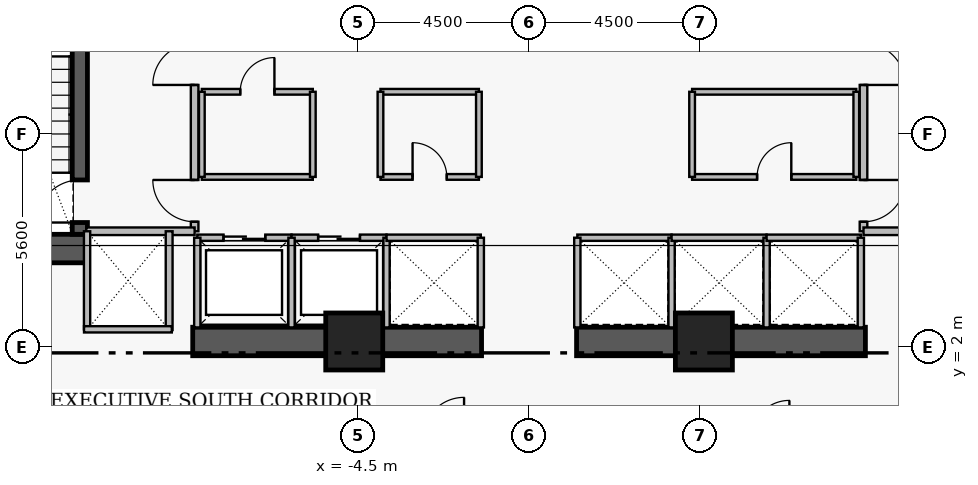
"""IFC4 building model, lengths in metres.
Left out: names, types, materials, properties, quantities, classifications, styles, units other than length and angle.
Written with IfcOpenShell. Run it as: python <this file> out.ifc"""

import sys

from ifc_helpers import new_model, si_unit, direction, frame, frame_2d, origin, origin_2d, place, context, subcontext, project, spatial, rectangle, extrude, element, fill, save


model = new_model("IFC4")
c1 = context("Model", 3, precision=1e-05, world=origin(), true_north=direction((0.0, 1.0)))
c2 = subcontext(c1, "Body", "Model", "MODEL_VIEW")
j1 = project(units=[si_unit("LENGTHUNIT", "METRE"), si_unit("PLANEANGLEUNIT", "RADIAN")], contexts=[c1])
p1 = place(None, origin())
s1 = spatial("IfcSite", under=j1, at=p1, CompositionType="ELEMENT")
p2 = place(p1, origin())
s2 = spatial("IfcBuilding", under=s1, at=p2, CompositionType="ELEMENT")
p3 = place(p2, frame((0.0, 0.0, 132.15)))
s3 = spatial("IfcBuildingStorey", under=s2, at=p3, CompositionType="ELEMENT", Elevation=132.15)
p4 = place(p3, frame((-16.16, 4.595, 0.0), z_axis=(0.0, 0.0, 1.0), x_axis=(1.0, 0.0, 0.0)))
e1 = element("IfcWall", 1, at=p4, inside=s3, PredefinedType="SHEAR", context=c2, shape_type="SweptSolid", body=[
    extrude(rectangle(XDim=4.56, YDim=0.75, at=frame_2d((2.28, 0.0))), origin(), (0.0, 0.0, 1.0), 3.46),
])
for number, where, z_axis, x_axis in (
    (2, (-8.85, 2.15, 0.0), (0.0, 0.0, 1.0), (1.0, 0.0, 0.0)),
    (3, (1.25, 2.15, 0.0), (0.0, 0.0, 1.0), (1.0, 0.0, 0.0)),
):
    element("IfcWall", number, at=place(p3, frame(where, z_axis=z_axis, x_axis=x_axis)), inside=s3, PredefinedType="SHEAR", context=c2, shape_type="SweptSolid", body=[
        extrude(rectangle(XDim=7.6, YDim=0.75, at=frame_2d((3.8, 0.0))), origin(), (0.0, 0.0, 1.0), 3.43),
    ])
p5 = place(p3, frame((-11.82, 4.97, 0.0), z_axis=(0.0, 0.0, 1.0), x_axis=(0.0, 1.0, 0.0)))
e4 = element("IfcWall", 4, at=p5, inside=s3, PredefinedType="SHEAR", context=c2, shape_type="SweptSolid", body=[
    extrude(rectangle(XDim=8.96, YDim=0.4, at=frame_2d((4.48, 0.0))), origin(), (0.0, 0.0, 1.0), 3.46),
])
p6 = place(p5, frame((0.31, 0.0, 0.0)))
e5 = element("IfcOpeningElement", 5, at=p6, cuts=e4, PredefinedType="OPENING", context=c2, shape_type="SweptSolid", body=[
    extrude(rectangle(XDim=1.12, YDim=2.22, at=frame_2d((0.56, 1.11))), frame((0.0, 0.21, 0.0), z_axis=(0.0, -1.0, 0.0), x_axis=(1.0, 0.0, 0.0)), (0.0, 0.0, 1.0), 0.42),
])
for number, where, z_axis, x_axis in (
    (6, (-4.6, 2.15, 0.0), (0.0, 0.0, 1.0), (1.0, 0.0, 0.0)),
    (7, (4.6, 2.15, 0.0), (0.0, 0.0, 1.0), (1.0, 0.0, 0.0)),
):
    element("IfcColumn", number, at=place(p3, frame(where, z_axis=z_axis, x_axis=x_axis)), inside=s3, PredefinedType="COLUMN", context=c2, shape_type="SweptSolid", body=[
        extrude(rectangle(XDim=1.5, YDim=1.5, at=origin_2d()), origin(), (0.0, 0.0, 1.0), 3.65),
    ])
p7 = place(p3, frame((-8.8, 5.05, 0.0), z_axis=(0.0, 0.0, 1.0), x_axis=(0.0, 1.0, 0.0)))
e8 = element("IfcWall", 8, at=p7, inside=s3, PredefinedType="PARTITIONING", context=c2, shape_type="SweptSolid", body=[
    extrude(rectangle(XDim=6.1, YDim=0.2, at=frame_2d((3.05, 0.0))), origin(), (0.0, 0.0, 1.0), 3.43),
])
p8 = place(p7, frame((0.25, 0.0, 0.0)))
e9 = element("IfcOpeningElement", 9, at=p8, cuts=e8, PredefinedType="OPENING", context=c2, shape_type="SweptSolid", body=[
    extrude(rectangle(XDim=1.1, YDim=2.2, at=frame_2d((0.55, 1.1))), frame((0.0, 0.11, 0.0), z_axis=(0.0, -1.0, 0.0), x_axis=(1.0, 0.0, 0.0)), (0.0, 0.0, 1.0), 0.22),
])
p9 = place(p7, frame((3.85, 0.0, 0.0)))
e10 = element("IfcOpeningElement", 10, at=p9, cuts=e8, PredefinedType="OPENING", context=c2, shape_type="SweptSolid", body=[
    extrude(rectangle(XDim=1.1, YDim=2.2, at=frame_2d((0.55, 1.1))), frame((0.0, 0.11, 0.0), z_axis=(0.0, -1.0, 0.0), x_axis=(1.0, 0.0, 0.0)), (0.0, 0.0, 1.0), 0.22),
])
p10 = place(p3, frame((8.8, 11.15, 0.0), z_axis=(0.0, 0.0, 1.0), x_axis=(0.0, -1.0, 0.0)))
e11 = element("IfcWall", 11, at=p10, inside=s3, PredefinedType="PARTITIONING", context=c2, shape_type="SweptSolid", body=[
    extrude(rectangle(XDim=6.1, YDim=0.2, at=frame_2d((3.05, 0.0))), origin(), (0.0, 0.0, 1.0), 3.43),
])
p11 = place(p10, frame((1.15, 0.0, 0.0)))
e12 = element("IfcOpeningElement", 12, at=p11, cuts=e11, PredefinedType="OPENING", context=c2, shape_type="SweptSolid", body=[
    extrude(rectangle(XDim=1.1, YDim=2.2, at=frame_2d((0.55, 1.1))), frame((0.0, 0.11, 0.0), z_axis=(0.0, -1.0, 0.0), x_axis=(1.0, 0.0, 0.0)), (0.0, 0.0, 1.0), 0.22),
])
p12 = place(p10, frame((4.75, 0.0, 0.0)))
e13 = element("IfcOpeningElement", 13, at=p12, cuts=e11, PredefinedType="OPENING", context=c2, shape_type="SweptSolid", body=[
    extrude(rectangle(XDim=1.1, YDim=2.2, at=frame_2d((0.55, 1.1))), frame((0.0, 0.11, 0.0), z_axis=(0.0, -1.0, 0.0), x_axis=(1.0, 0.0, 0.0)), (0.0, 0.0, 1.0), 0.22),
])
p13 = place(p3, frame((-8.73, 4.88, 0.0), z_axis=(0.0, 0.0, 1.0), x_axis=(1.0, 0.0, 0.0)))
e14 = element("IfcWall", 14, at=p13, inside=s3, PredefinedType="PARTITIONING", context=c2, shape_type="SweptSolid", body=[
    extrude(rectangle(XDim=2.48, YDim=0.165, at=frame_2d((1.24, 0.0))), origin(), (0.0, 0.0, 1.0), 3.43),
])
p14 = place(p13, frame((0.69, 0.0, 0.0)))
e15 = element("IfcOpeningElement", 15, at=p14, cuts=e14, PredefinedType="OPENING", context=c2, shape_type="SweptSolid", body=[
    extrude(rectangle(XDim=1.1, YDim=2.25, at=frame_2d((0.55, 1.125))), frame((0.0, 0.093, 0.0), z_axis=(0.0, -1.0, 0.0), x_axis=(1.0, 0.0, 0.0)), (0.0, 0.0, 1.0), 0.185),
])
p15 = place(p3, frame((-6.25, 4.88, 0.0), z_axis=(0.0, 0.0, 1.0), x_axis=(1.0, 0.0, 0.0)))
e16 = element("IfcWall", 16, at=p15, inside=s3, PredefinedType="PARTITIONING", context=c2, shape_type="SweptSolid", body=[
    extrude(rectangle(XDim=2.5, YDim=0.165, at=frame_2d((1.25, 0.0))), origin(), (0.0, 0.0, 1.0), 3.43),
])
p16 = place(p15, frame((0.7, 0.0, 0.0)))
e17 = element("IfcOpeningElement", 17, at=p16, cuts=e16, PredefinedType="OPENING", context=c2, shape_type="SweptSolid", body=[
    extrude(rectangle(XDim=1.1, YDim=2.25, at=frame_2d((0.55, 1.125))), frame((0.0, 0.093, 0.0), z_axis=(0.0, -1.0, 0.0), x_axis=(1.0, 0.0, 0.0)), (0.0, 0.0, 1.0), 0.185),
])
p17 = place(p3, frame((-8.61, 8.72, 0.0), z_axis=(0.0, 0.0, 1.0), x_axis=(1.0, 0.0, 0.0)))
e18 = element("IfcWall", 18, at=p17, inside=s3, PredefinedType="PARTITIONING", context=c2, shape_type="SweptSolid", body=[
    extrude(rectangle(XDim=2.92, YDim=0.15, at=frame_2d((1.46, 0.0))), origin(), (0.0, 0.0, 1.0), 3.43),
])
p18 = place(p17, frame((1.01, 0.0, 0.0)))
e19 = element("IfcOpeningElement", 19, at=p18, cuts=e18, PredefinedType="OPENING", context=c2, shape_type="SweptSolid", body=[
    extrude(rectangle(XDim=0.9, YDim=2.15, at=frame_2d((0.45, 1.075))), frame((0.0, 0.085, 0.0), z_axis=(0.0, -1.0, 0.0), x_axis=(1.0, 0.0, 0.0)), (0.0, 0.0, 1.0), 0.17),
])
p19 = place(p3, frame((-3.91, 6.48, 0.0), z_axis=(0.0, 0.0, 1.0), x_axis=(1.0, 0.0, 0.0)))
e20 = element("IfcWall", 20, at=p19, inside=s3, PredefinedType="PARTITIONING", context=c2, shape_type="SweptSolid", body=[
    extrude(rectangle(XDim=2.59, YDim=0.15, at=frame_2d((1.295, 0.0))), origin(), (0.0, 0.0, 1.0), 3.43),
])
p20 = place(p19, frame((0.845, 0.0, 0.0)))
e21 = element("IfcOpeningElement", 21, at=p20, cuts=e20, PredefinedType="OPENING", context=c2, shape_type="SweptSolid", body=[
    extrude(rectangle(XDim=0.9, YDim=2.15, at=frame_2d((0.45, 1.075))), frame((0.0, 0.085, 0.0), z_axis=(0.0, -1.0, 0.0), x_axis=(1.0, 0.0, 0.0)), (0.0, 0.0, 1.0), 0.17),
])
p21 = place(p3, frame((4.29, 6.48, 0.0), z_axis=(0.0, 0.0, 1.0), x_axis=(1.0, 0.0, 0.0)))
e22 = element("IfcWall", 22, at=p21, inside=s3, PredefinedType="PARTITIONING", context=c2, shape_type="SweptSolid", body=[
    extrude(rectangle(XDim=4.32, YDim=0.15, at=frame_2d((2.16, 0.0))), origin(), (0.0, 0.0, 1.0), 3.43),
])
p22 = place(p21, frame((1.71, 0.0, 0.0)))
e23 = element("IfcOpeningElement", 23, at=p22, cuts=e22, PredefinedType="OPENING", context=c2, shape_type="SweptSolid", body=[
    extrude(rectangle(XDim=0.9, YDim=2.15, at=frame_2d((0.45, 1.075))), frame((0.0, 0.085, 0.0), z_axis=(0.0, -1.0, 0.0), x_axis=(1.0, 0.0, 0.0)), (0.0, 0.0, 1.0), 0.17),
])
for number, where, z_axis, x_axis in (
    (24, (-11.65, 5.05, 0.0), (0.0, 0.0, 1.0), (1.0, 0.0, 0.0)),
    (25, (8.8, 5.05, 0.0), (0.0, 0.0, 1.0), (1.0, 0.0, 0.0)),
):
    element("IfcWall", number, at=place(p3, frame(where, z_axis=z_axis, x_axis=x_axis)), inside=s3, PredefinedType="PARTITIONING", context=c2, shape_type="SweptSolid", body=[
        extrude(rectangle(XDim=2.85, YDim=0.2, at=frame_2d((1.425, 0.0))), origin(), (0.0, 0.0, 1.0), 3.43),
    ])
for number, where, z_axis, x_axis in (
    (26, (-8.73, 2.52, 0.0), (0.0, 0.0, 1.0), (0.0, 1.0, 0.0)),
    (27, (-6.25, 2.52, 0.0), (0.0, 0.0, 1.0), (0.0, 1.0, 0.0)),
    (28, (-3.75, 2.52, 0.0), (0.0, 0.0, 1.0), (0.0, 1.0, 0.0)),
):
    element("IfcWall", number, at=place(p3, frame(where, z_axis=z_axis, x_axis=x_axis)), inside=s3, PredefinedType="PARTITIONING", context=c2, shape_type="SweptSolid", body=[
        extrude(rectangle(XDim=2.36, YDim=0.165, at=frame_2d((1.18, 0.0))), origin(), (0.0, 0.0, 1.0), 3.43),
    ])
p23 = place(p3, frame((-3.75, 4.88, 0.0), z_axis=(0.0, 0.0, 1.0), x_axis=(1.0, 0.0, 0.0)))
e29 = element("IfcWall", 29, at=p23, inside=s3, PredefinedType="PARTITIONING", context=c2, shape_type="SweptSolid", body=[
    extrude(rectangle(XDim=2.48, YDim=0.165, at=frame_2d((1.24, 0.0))), origin(), (0.0, 0.0, 1.0), 3.43),
])
p24 = place(p3, frame((-1.27, 2.52, 0.0), z_axis=(0.0, 0.0, 1.0), x_axis=(0.0, 1.0, 0.0)))
e30 = element("IfcWall", 30, at=p24, inside=s3, PredefinedType="PARTITIONING", context=c2, shape_type="SweptSolid", body=[
    extrude(rectangle(XDim=2.36, YDim=0.165, at=frame_2d((1.18, 0.0))), origin(), (0.0, 0.0, 1.0), 3.43),
])
p25 = place(p3, frame((1.27, 4.88, 0.0), z_axis=(0.0, 0.0, 1.0), x_axis=(1.0, 0.0, 0.0)))
e31 = element("IfcWall", 31, at=p25, inside=s3, PredefinedType="PARTITIONING", context=c2, shape_type="SweptSolid", body=[
    extrude(rectangle(XDim=2.48, YDim=0.165, at=frame_2d((1.24, 0.0))), origin(), (0.0, 0.0, 1.0), 3.43),
])
for number, where, z_axis, x_axis in (
    (32, (1.27, 2.52, 0.0), (0.0, 0.0, 1.0), (0.0, 1.0, 0.0)),
    (33, (3.75, 2.52, 0.0), (0.0, 0.0, 1.0), (0.0, 1.0, 0.0)),
):
    element("IfcWall", number, at=place(p3, frame(where, z_axis=z_axis, x_axis=x_axis)), inside=s3, PredefinedType="PARTITIONING", context=c2, shape_type="SweptSolid", body=[
        extrude(rectangle(XDim=2.36, YDim=0.165, at=frame_2d((1.18, 0.0))), origin(), (0.0, 0.0, 1.0), 3.43),
    ])
p26 = place(p3, frame((3.75, 4.88, 0.0), z_axis=(0.0, 0.0, 1.0), x_axis=(1.0, 0.0, 0.0)))
e34 = element("IfcWall", 34, at=p26, inside=s3, PredefinedType="PARTITIONING", context=c2, shape_type="SweptSolid", body=[
    extrude(rectangle(XDim=2.5, YDim=0.165, at=frame_2d((1.25, 0.0))), origin(), (0.0, 0.0, 1.0), 3.43),
])
p27 = place(p3, frame((6.25, 2.52, 0.0), z_axis=(0.0, 0.0, 1.0), x_axis=(0.0, 1.0, 0.0)))
e35 = element("IfcWall", 35, at=p27, inside=s3, PredefinedType="PARTITIONING", context=c2, shape_type="SweptSolid", body=[
    extrude(rectangle(XDim=2.36, YDim=0.165, at=frame_2d((1.18, 0.0))), origin(), (0.0, 0.0, 1.0), 3.43),
])
p28 = place(p3, frame((6.25, 4.88, 0.0), z_axis=(0.0, 0.0, 1.0), x_axis=(1.0, 0.0, 0.0)))
e36 = element("IfcWall", 36, at=p28, inside=s3, PredefinedType="PARTITIONING", context=c2, shape_type="SweptSolid", body=[
    extrude(rectangle(XDim=2.48, YDim=0.165, at=frame_2d((1.24, 0.0))), origin(), (0.0, 0.0, 1.0), 3.43),
])
p29 = place(p3, frame((8.73, 2.52, 0.0), z_axis=(0.0, 0.0, 1.0), x_axis=(0.0, 1.0, 0.0)))
e37 = element("IfcWall", 37, at=p29, inside=s3, PredefinedType="PARTITIONING", context=c2, shape_type="SweptSolid", body=[
    extrude(rectangle(XDim=2.36, YDim=0.165, at=frame_2d((1.18, 0.0))), origin(), (0.0, 0.0, 1.0), 3.43),
])
p30 = place(p3, frame((-9.47, 2.45, 0.0), z_axis=(0.0, 0.0, 1.0), x_axis=(0.0, 1.0, 0.0)))
e38 = element("IfcWall", 38, at=p30, inside=s3, PredefinedType="PARTITIONING", context=c2, shape_type="SweptSolid", body=[
    extrude(rectangle(XDim=2.6, YDim=0.18, at=frame_2d((1.3, 0.0))), origin(), (0.0, 0.0, 1.0), 3.43),
])
p31 = place(p3, frame((-11.63, 2.47, 0.0), z_axis=(0.0, 0.0, 1.0), x_axis=(0.0, 1.0, 0.0)))
e39 = element("IfcWall", 39, at=p31, inside=s3, PredefinedType="PARTITIONING", context=c2, shape_type="SweptSolid", body=[
    extrude(rectangle(XDim=2.58, YDim=0.165, at=frame_2d((1.29, 0.0))), origin(), (0.0, 0.0, 1.0), 3.43),
])
p32 = place(p3, frame((-11.71, 2.47, 0.0), z_axis=(0.0, 0.0, 1.0), x_axis=(1.0, 0.0, 0.0)))
e40 = element("IfcWall", 40, at=p32, inside=s3, PredefinedType="PARTITIONING", context=c2, shape_type="SweptSolid", body=[
    extrude(rectangle(XDim=2.31, YDim=0.165, at=frame_2d((1.155, 0.0))), origin(), (0.0, 0.0, 1.0), 2.03),
])
p33 = place(p3, frame((-8.61, 6.48, 0.0), z_axis=(0.0, 0.0, 1.0), x_axis=(1.0, 0.0, 0.0)))
e41 = element("IfcWall", 41, at=p33, inside=s3, PredefinedType="PARTITIONING", context=c2, shape_type="SweptSolid", body=[
    extrude(rectangle(XDim=2.92, YDim=0.15, at=frame_2d((1.46, 0.0))), origin(), (0.0, 0.0, 1.0), 3.43),
])
for number, where, z_axis, x_axis in (
    (42, (-8.61, 6.48, 0.0), (0.0, 0.0, 1.0), (0.0, 1.0, 0.0)),
    (43, (-5.69, 6.48, 0.0), (0.0, 0.0, 1.0), (0.0, 1.0, 0.0)),
):
    element("IfcWall", number, at=place(p3, frame(where, z_axis=z_axis, x_axis=x_axis)), inside=s3, PredefinedType="PARTITIONING", context=c2, shape_type="SweptSolid", body=[
        extrude(rectangle(XDim=2.24, YDim=0.15, at=frame_2d((1.12, 0.0))), origin(), (0.0, 0.0, 1.0), 3.43),
    ])
p34 = place(p3, frame((-3.91, 8.72, 0.0), z_axis=(0.0, 0.0, 1.0), x_axis=(1.0, 0.0, 0.0)))
e44 = element("IfcWall", 44, at=p34, inside=s3, PredefinedType="PARTITIONING", context=c2, shape_type="SweptSolid", body=[
    extrude(rectangle(XDim=2.59, YDim=0.15, at=frame_2d((1.295, 0.0))), origin(), (0.0, 0.0, 1.0), 3.43),
])
for number, where, z_axis, x_axis in (
    (45, (-3.91, 6.48, 0.0), (0.0, 0.0, 1.0), (0.0, 1.0, 0.0)),
    (46, (-1.32, 6.48, 0.0), (0.0, 0.0, 1.0), (0.0, 1.0, 0.0)),
):
    element("IfcWall", number, at=place(p3, frame(where, z_axis=z_axis, x_axis=x_axis)), inside=s3, PredefinedType="PARTITIONING", context=c2, shape_type="SweptSolid", body=[
        extrude(rectangle(XDim=2.24, YDim=0.15, at=frame_2d((1.12, 0.0))), origin(), (0.0, 0.0, 1.0), 3.43),
    ])
p35 = place(p3, frame((4.29, 8.72, 0.0), z_axis=(0.0, 0.0, 1.0), x_axis=(1.0, 0.0, 0.0)))
e47 = element("IfcWall", 47, at=p35, inside=s3, PredefinedType="PARTITIONING", context=c2, shape_type="SweptSolid", body=[
    extrude(rectangle(XDim=4.32, YDim=0.15, at=frame_2d((2.16, 0.0))), origin(), (0.0, 0.0, 1.0), 3.43),
])
for number, where, z_axis, x_axis in (
    (48, (4.29, 6.48, 0.0), (0.0, 0.0, 1.0), (0.0, 1.0, 0.0)),
    (49, (8.61, 6.48, 0.0), (0.0, 0.0, 1.0), (0.0, 1.0, 0.0)),
):
    element("IfcWall", number, at=place(p3, frame(where, z_axis=z_axis, x_axis=x_axis)), inside=s3, PredefinedType="PARTITIONING", context=c2, shape_type="SweptSolid", body=[
        extrude(rectangle(XDim=2.24, YDim=0.15, at=frame_2d((1.12, 0.0))), origin(), (0.0, 0.0, 1.0), 3.43),
    ])
p36 = place(p6, origin())
e50 = element("IfcDoor", 50, at=p36, inside=s3, OperationType="SINGLE_SWING_LEFT", PredefinedType="DOOR", context=c2, shape_type="SweptSolid", body=[
    extrude(rectangle(XDim=1.12, YDim=2.22, at=frame_2d((0.56, 1.11))), frame((0.0, 0.025, 0.0), z_axis=(0.0, -1.0, 0.0), x_axis=(1.0, 0.0, 0.0)), (0.0, 0.0, 1.0), 0.05),
])
fill(e5, e50)
p37 = place(p8, origin())
e51 = element("IfcDoor", 51, at=p37, inside=s3, OperationType="SINGLE_SWING_RIGHT", PredefinedType="DOOR", context=c2, shape_type="SweptSolid", body=[
    extrude(rectangle(XDim=1.1, YDim=2.2, at=frame_2d((0.55, 1.1))), frame((0.0, 0.025, 0.0), z_axis=(0.0, -1.0, 0.0), x_axis=(1.0, 0.0, 0.0)), (0.0, 0.0, 1.0), 0.05),
])
fill(e9, e51)
p38 = place(p9, origin())
e52 = element("IfcDoor", 52, at=p38, inside=s3, OperationType="SINGLE_SWING_LEFT", PredefinedType="DOOR", context=c2, shape_type="SweptSolid", body=[
    extrude(rectangle(XDim=1.1, YDim=2.2, at=frame_2d((0.55, 1.1))), frame((0.0, 0.025, 0.0), z_axis=(0.0, -1.0, 0.0), x_axis=(1.0, 0.0, 0.0)), (0.0, 0.0, 1.0), 0.05),
])
fill(e10, e52)
p39 = place(p11, origin())
e53 = element("IfcDoor", 53, at=p39, inside=s3, OperationType="SINGLE_SWING_RIGHT", PredefinedType="DOOR", context=c2, shape_type="SweptSolid", body=[
    extrude(rectangle(XDim=1.1, YDim=2.2, at=frame_2d((0.55, 1.1))), frame((0.0, 0.025, 0.0), z_axis=(0.0, -1.0, 0.0), x_axis=(1.0, 0.0, 0.0)), (0.0, 0.0, 1.0), 0.05),
])
fill(e12, e53)
p40 = place(p12, origin())
e54 = element("IfcDoor", 54, at=p40, inside=s3, OperationType="SINGLE_SWING_LEFT", PredefinedType="DOOR", context=c2, shape_type="SweptSolid", body=[
    extrude(rectangle(XDim=1.1, YDim=2.2, at=frame_2d((0.55, 1.1))), frame((0.0, 0.025, 0.0), z_axis=(0.0, -1.0, 0.0), x_axis=(1.0, 0.0, 0.0)), (0.0, 0.0, 1.0), 0.05),
])
fill(e13, e54)
p41 = place(p14, origin())
e55 = element("IfcDoor", 55, at=p41, inside=s3, OperationType="SLIDING_TO_LEFT", PredefinedType="DOOR", context=c2, shape_type="SweptSolid", body=[
    extrude(rectangle(XDim=1.1, YDim=2.25, at=frame_2d((0.55, 1.125))), frame((0.0, 0.025, 0.0), z_axis=(0.0, -1.0, 0.0), x_axis=(1.0, 0.0, 0.0)), (0.0, 0.0, 1.0), 0.05),
])
fill(e15, e55)
p42 = place(p16, origin())
e56 = element("IfcDoor", 56, at=p42, inside=s3, OperationType="SLIDING_TO_LEFT", PredefinedType="DOOR", context=c2, shape_type="SweptSolid", body=[
    extrude(rectangle(XDim=1.1, YDim=2.25, at=frame_2d((0.55, 1.125))), frame((0.0, 0.025, 0.0), z_axis=(0.0, -1.0, 0.0), x_axis=(1.0, 0.0, 0.0)), (0.0, 0.0, 1.0), 0.05),
])
fill(e17, e56)
p43 = place(p18, origin())
e57 = element("IfcDoor", 57, at=p43, inside=s3, OperationType="SINGLE_SWING_RIGHT", PredefinedType="DOOR", context=c2, shape_type="SweptSolid", body=[
    extrude(rectangle(XDim=0.9, YDim=2.15, at=frame_2d((0.45, 1.075))), frame((0.0, 0.025, 0.0), z_axis=(0.0, -1.0, 0.0), x_axis=(1.0, 0.0, 0.0)), (0.0, 0.0, 1.0), 0.05),
])
fill(e19, e57)
p44 = place(p20, origin())
e58 = element("IfcDoor", 58, at=p44, inside=s3, OperationType="SINGLE_SWING_LEFT", PredefinedType="DOOR", context=c2, shape_type="SweptSolid", body=[
    extrude(rectangle(XDim=0.9, YDim=2.15, at=frame_2d((0.45, 1.075))), frame((0.0, 0.025, 0.0), z_axis=(0.0, -1.0, 0.0), x_axis=(1.0, 0.0, 0.0)), (0.0, 0.0, 1.0), 0.05),
])
fill(e21, e58)
p45 = place(p22, origin())
e59 = element("IfcDoor", 59, at=p45, inside=s3, OperationType="SINGLE_SWING_RIGHT", PredefinedType="DOOR", context=c2, shape_type="SweptSolid", body=[
    extrude(rectangle(XDim=0.9, YDim=2.15, at=frame_2d((0.45, 1.075))), frame((0.0, 0.025, 0.0), z_axis=(0.0, -1.0, 0.0), x_axis=(1.0, 0.0, 0.0)), (0.0, 0.0, 1.0), 0.05),
])
fill(e23, e59)
save(model, sys.argv[1])
